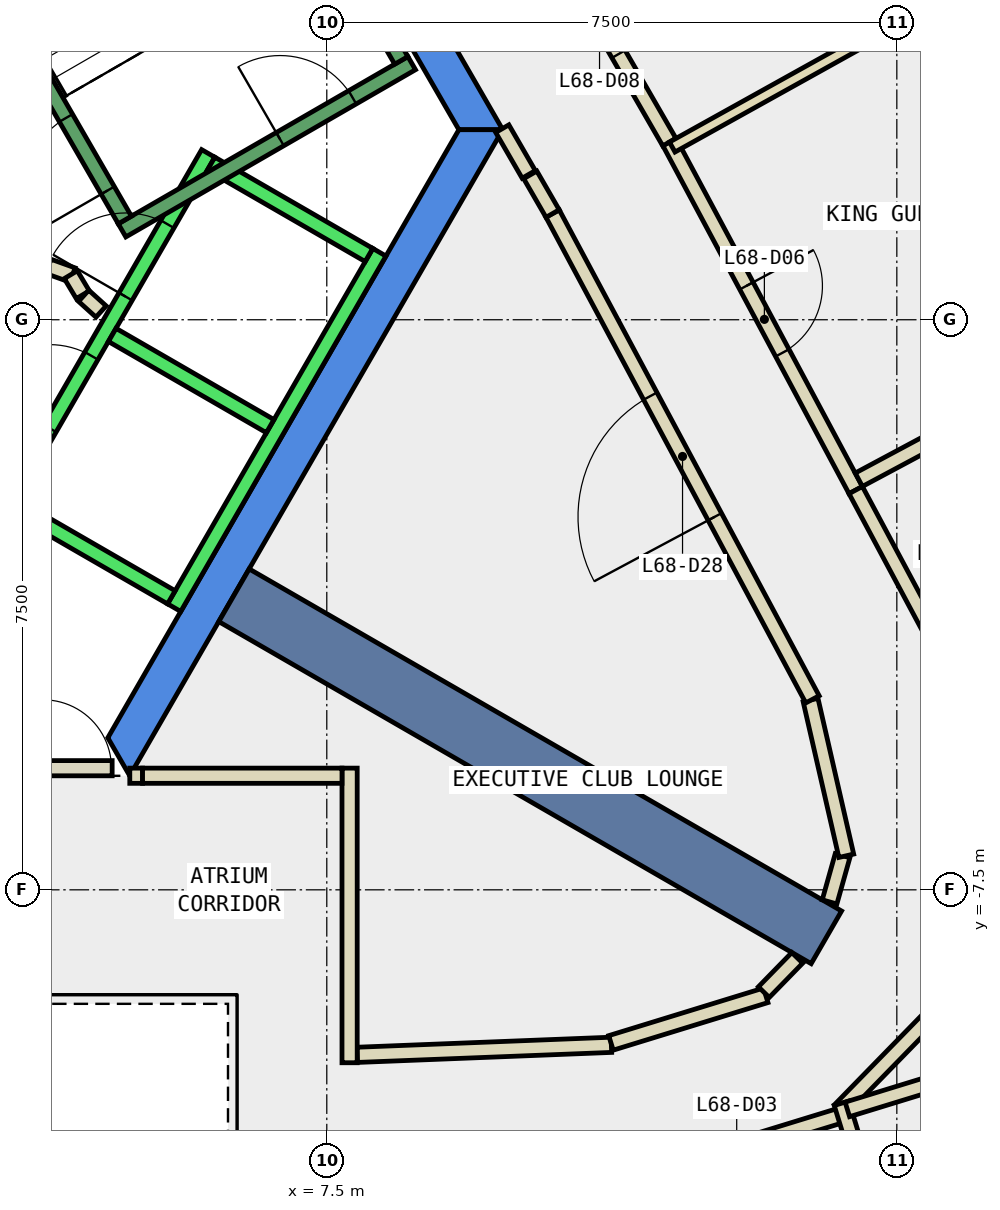
"""IFC4 building model, lengths in metres.
Left out: names, types, materials, properties, quantities, classifications, styles, units other than length and angle.
Written with IfcOpenShell. Run it as: python <this file> out.ifc"""

import sys

from ifc_helpers import new_model, si_unit, direction, frame, frame_2d, origin, place, context, subcontext, project, spatial, polyline, rectangle, outline, extrude, element, fill, save


model = new_model("IFC4")
c1 = context("Model", 3, precision=1e-05, world=origin(), true_north=direction((0.0, 1.0)))
c2 = subcontext(c1, "Body", "Model", "MODEL_VIEW")
j1 = project(units=[si_unit("LENGTHUNIT", "METRE"), si_unit("PLANEANGLEUNIT", "RADIAN")], contexts=[c1])
p1 = place(None, origin())
s1 = spatial("IfcSite", under=j1, at=p1, CompositionType="ELEMENT")
p2 = place(p1, origin())
s2 = spatial("IfcBuilding", under=s1, at=p2, CompositionType="ELEMENT")
p3 = place(p2, frame((0.0, 0.0, 293.6)))
s3 = spatial("IfcBuildingStorey", under=s2, at=p3, CompositionType="ELEMENT", Elevation=293.6)
p4 = place(p3, frame((0.0, 0.0, -0.34)))
e1 = element("IfcWall", 1, at=p4, inside=s3, PredefinedType="SHEAR", context=c2, shape_type="SweptSolid", body=[
    extrude(outline(polyline([(5.486, 9.998), (5.053, 9.748), (9.238, 2.5), (9.815, 2.5), (5.486, 9.998)])), origin(), (0.0, 0.0, 1.0), 3.6),
])
p5 = place(p3, frame((0.0, 0.0, -0.34)))
e2 = element("IfcWall", 2, at=p5, inside=s3, PredefinedType="SHEAR", context=c2, shape_type="SweptSolid", body=[
    extrude(outline(polyline([(4.907, -6.0), (9.815, 2.5), (9.238, 2.5), (4.619, -5.5), (4.907, -6.0)])), origin(), (0.0, 0.0, 1.0), 3.6),
])
p6 = place(p3, frame((6.279, -3.625, -0.34), z_axis=(0.0, 0.0, 1.0), x_axis=(0.866017533419, -0.500013631625, 0.0)))
e3 = element("IfcWall", 3, at=p6, inside=s3, PredefinedType="SHEAR", context=c2, shape_type="SweptSolid", body=[
    extrude(rectangle(XDim=9.0, YDim=0.8, at=frame_2d((4.5, 0.0))), origin(), (0.0, 0.0, 1.0), 3.6),
])
p7 = place(p3, frame((7.9, -9.671, 0.0), z_axis=(0.0, 0.0, 1.0), x_axis=(0.999223751627, 0.039394088186, 0.0)))
e4 = element("IfcWall", 4, at=p7, inside=s3, PredefinedType="PARTITIONING", context=c2, shape_type="SweptSolid", body=[
    extrude(rectangle(XDim=3.347, YDim=0.2, at=frame_2d((1.673, 0.0))), origin(), (0.0, 0.0, 1.0), 3.26),
])
p8 = place(p3, frame((11.239, -9.514, 0.0), z_axis=(0.0, 0.0, 1.0), x_axis=(0.955838469047, 0.293892533234, 0.0)))
e5 = element("IfcWall", 5, at=p8, inside=s3, PredefinedType="PARTITIONING", context=c2, shape_type="SweptSolid", body=[
    extrude(rectangle(XDim=2.13, YDim=0.2, at=frame_2d((1.065, 0.0))), origin(), (0.0, 0.0, 1.0), 3.26),
])
p9 = place(p3, frame((13.25, -8.846, 0.0), z_axis=(0.0, 0.0, 1.0), x_axis=(0.698333537371, 0.715772499181, 0.0)))
e6 = element("IfcWall", 6, at=p9, inside=s3, PredefinedType="PARTITIONING", context=c2, shape_type="SweptSolid", body=[
    extrude(rectangle(XDim=0.63, YDim=0.2, at=frame_2d((0.315, 0.0))), origin(), (0.0, 0.0, 1.0), 3.26),
])
p10 = place(p3, frame((14.115, -7.659, 0.0), z_axis=(0.0, 0.0, 1.0), x_axis=(0.270633612894, 0.96268242301, 0.0)))
e7 = element("IfcWall", 7, at=p10, inside=s3, PredefinedType="PARTITIONING", context=c2, shape_type="SweptSolid", body=[
    extrude(rectangle(XDim=0.632, YDim=0.2, at=frame_2d((0.316, 0.0))), origin(), (0.0, 0.0, 1.0), 3.26),
])
p11 = place(p3, frame((14.335, -7.052, 0.0), z_axis=(0.0, 0.0, 1.0), x_axis=(-0.22355315143, 0.974691740237, 0.0)))
e8 = element("IfcWall", 8, at=p11, inside=s3, PredefinedType="PARTITIONING", context=c2, shape_type="SweptSolid", body=[
    extrude(rectangle(XDim=2.102, YDim=0.2, at=frame_2d((1.051, 0.0))), origin(), (0.0, 0.0, 1.0), 3.26),
])
p12 = place(p3, frame((13.89, -4.994, 0.0), z_axis=(0.0, 0.0, 1.0), x_axis=(-0.471713767504, 0.881751734644, 0.0)))
e9 = element("IfcWall", 9, at=p12, inside=s3, PredefinedType="PARTITIONING", context=c2, shape_type="SweptSolid", body=[
    extrude(rectangle(XDim=7.248, YDim=0.2, at=frame_2d((3.624, 0.0))), origin(), (0.0, 0.0, 1.0), 3.26),
])
p13 = place(p12, frame((2.724, 0.0, 0.0)))
e10 = element("IfcOpeningElement", 10, at=p13, cuts=e9, PredefinedType="OPENING", context=c2, shape_type="SweptSolid", body=[
    extrude(rectangle(XDim=1.8, YDim=2.1, at=frame_2d((0.9, 1.05))), frame((0.0, 0.11, 0.0), z_axis=(0.0, -1.0, 0.0), x_axis=(1.0, 0.0, 0.0)), (0.0, 0.0, 1.0), 0.22),
])
p14 = place(p3, frame((10.471, 1.397, 0.0), z_axis=(0.0, 0.0, 1.0), x_axis=(-0.500069990121, 0.865984991198, 0.0)))
e11 = element("IfcWall", 11, at=p14, inside=s3, PredefinedType="PARTITIONING", context=c2, shape_type="SweptSolid", body=[
    extrude(rectangle(XDim=0.588, YDim=0.2, at=frame_2d((0.294, 0.0))), origin(), (0.0, 0.0, 1.0), 3.26),
])
p15 = place(p3, frame((10.157, 1.912, 0.0), z_axis=(0.0, 0.0, 1.0), x_axis=(-0.500482383858, 0.865746720148, 0.0)))
e12 = element("IfcWall", 12, at=p15, inside=s3, PredefinedType="PARTITIONING", context=c2, shape_type="SweptSolid", body=[
    extrude(rectangle(XDim=0.695, YDim=0.2, at=frame_2d((0.348, 0.0))), origin(), (0.0, 0.0, 1.0), 3.26),
])
p16 = place(p3, frame((14.243, -10.474, 0.0), z_axis=(0.0, 0.0, 1.0), x_axis=(-0.955937788993, -0.293569316475, 0.0)))
e13 = element("IfcWall", 13, at=p16, inside=s3, PredefinedType="PARTITIONING", context=c2, shape_type="SweptSolid", body=[
    extrude(rectangle(XDim=2.823, YDim=0.2, at=frame_2d((1.412, 0.0))), origin(), (0.0, 0.0, 1.0), 3.26),
])
p17 = place(p16, frame((0.912, 0.0, 0.0)))
e14 = element("IfcOpeningElement", 14, at=p17, cuts=e13, PredefinedType="OPENING", context=c2, shape_type="SweptSolid", body=[
    extrude(rectangle(XDim=1.0, YDim=2.1, at=frame_2d((0.5, 1.05))), frame((0.0, 0.11, 0.0), z_axis=(0.0, -1.0, 0.0), x_axis=(1.0, 0.0, 0.0)), (0.0, 0.0, 1.0), 0.22),
])
p18 = place(p3, frame((15.535, -9.081, 0.0), z_axis=(0.0, 0.0, 1.0), x_axis=(-0.698342132704, -0.715764113162, 0.0)))
e15 = element("IfcWall", 15, at=p18, inside=s3, PredefinedType="PARTITIONING", context=c2, shape_type="SweptSolid", body=[
    extrude(rectangle(XDim=1.836, YDim=0.2, at=frame_2d((0.918, 0.0))), origin(), (0.0, 0.0, 1.0), 3.26),
])
p19 = place(p3, frame((12.009, 2.338, 0.0), z_axis=(0.0, 0.0, 1.0), x_axis=(0.471771260231, -0.88172097515, 0.0)))
e16 = element("IfcWall", 16, at=p19, inside=s3, PredefinedType="PARTITIONING", context=c2, shape_type="SweptSolid", body=[
    extrude(rectangle(XDim=5.193, YDim=0.2, at=frame_2d((2.597, 0.0))), origin(), (0.0, 0.0, 1.0), 3.26),
])
p20 = place(p19, frame((2.146, 0.0, 0.0)))
e17 = element("IfcOpeningElement", 17, at=p20, cuts=e16, PredefinedType="OPENING", context=c2, shape_type="SweptSolid", body=[
    extrude(rectangle(XDim=1.0, YDim=2.1, at=frame_2d((0.5, 1.05))), frame((0.0, 0.11, 0.0), z_axis=(0.0, -1.0, 0.0), x_axis=(1.0, 0.0, 0.0)), (0.0, 0.0, 1.0), 0.22),
])
p21 = place(p3, frame((14.459, -2.241, 0.0), z_axis=(0.0, 0.0, 1.0), x_axis=(0.471648235011, -0.881786789656, 0.0)))
e18 = element("IfcWall", 18, at=p21, inside=s3, PredefinedType="PARTITIONING", context=c2, shape_type="SweptSolid", body=[
    extrude(rectangle(XDim=2.199, YDim=0.2, at=frame_2d((1.1, 0.0))), origin(), (0.0, 0.0, 1.0), 3.26),
])
p22 = place(p3, frame((10.17, 5.519, 0.0), z_axis=(0.0, 0.0, 1.0), x_axis=(0.499990860175, -0.866030680601, 0.0)))
e19 = element("IfcWall", 19, at=p22, inside=s3, PredefinedType="PARTITIONING", context=c2, shape_type="SweptSolid", body=[
    extrude(rectangle(XDim=3.674, YDim=0.2, at=frame_2d((1.837, 0.0))), origin(), (0.0, 0.0, 1.0), 3.26),
])
p23 = place(p22, frame((1.337, 0.0, 0.0)))
e20 = element("IfcOpeningElement", 20, at=p23, cuts=e19, PredefinedType="OPENING", context=c2, shape_type="SweptSolid", body=[
    extrude(rectangle(XDim=1.0, YDim=2.1, at=frame_2d((0.5, 1.05))), frame((0.0, 0.11, 0.0), z_axis=(0.0, -1.0, 0.0), x_axis=(1.0, 0.0, 0.0)), (0.0, 0.0, 1.0), 0.22),
])
p24 = place(p3, frame((3.838, 0.702, 0.0), z_axis=(0.0, 0.0, 1.0), x_axis=(0.941035081519, -0.338308993895, 0.0)))
e21 = element("IfcWall", 21, at=p24, inside=s3, PredefinedType="PARTITIONING", context=c2, shape_type="SweptSolid", body=[
    extrude(rectangle(XDim=0.337, YDim=0.2, at=frame_2d((0.168, 0.0))), origin(), (0.0, 0.0, 1.0), 3.26),
])
p25 = place(p3, frame((4.132, 0.593, 0.0), z_axis=(0.0, 0.0, 1.0), x_axis=(0.513561617048, -0.858052717201, 0.0)))
e22 = element("IfcWall", 22, at=p25, inside=s3, PredefinedType="PARTITIONING", context=c2, shape_type="SweptSolid", body=[
    extrude(rectangle(XDim=0.308, YDim=0.2, at=frame_2d((0.154, 0.0))), origin(), (0.0, 0.0, 1.0), 3.26),
])
p26 = place(p3, frame((4.301, 0.315, 0.0), z_axis=(0.0, 0.0, 1.0), x_axis=(0.741798017506, -0.670623367639, 0.0)))
e23 = element("IfcWall", 23, at=p26, inside=s3, PredefinedType="PARTITIONING", context=c2, shape_type="SweptSolid", body=[
    extrude(rectangle(XDim=0.309, YDim=0.2, at=frame_2d((0.154, 0.0))), origin(), (0.0, 0.0, 1.0), 3.26),
])
p27 = place(p3, frame((4.908, -5.999, 0.0), z_axis=(0.0, 0.0, 1.0), x_axis=(1.0, 0.0, 0.0)))
e24 = element("IfcWall", 24, at=p27, inside=s3, PredefinedType="PARTITIONING", context=c2, shape_type="SweptSolid", body=[
    extrude(rectangle(XDim=0.168, YDim=0.2, at=frame_2d((0.084, 0.0))), origin(), (0.0, 0.0, 1.0), 2.4),
])
p28 = place(p3, frame((7.8, -5.899, 0.0), z_axis=(0.0, 0.0, 1.0), x_axis=(0.0, -1.0, 0.0)))
e25 = element("IfcWall", 25, at=p28, inside=s3, PredefinedType="PARTITIONING", context=c2, shape_type="SweptSolid", body=[
    extrude(rectangle(XDim=3.876, YDim=0.2, at=frame_2d((1.938, 0.0))), origin(), (0.0, 0.0, 1.0), 3.26),
])
p29 = place(p3, frame((14.272, -10.308, 0.0), z_axis=(0.0, 0.0, 1.0), x_axis=(0.293868765171, -0.955845776711, 0.0)))
e26 = element("IfcWall", 26, at=p29, inside=s3, PredefinedType="PARTITIONING", context=c2, shape_type="SweptSolid", body=[
    extrude(rectangle(XDim=2.45, YDim=0.2, at=frame_2d((1.225, 0.0))), origin(), (0.0, 0.0, 1.0), 3.26),
])
p30 = place(p3, frame((16.022, -9.875, 0.0), z_axis=(0.0, 0.0, 1.0), x_axis=(-0.955908620472, -0.293664279932, 0.0)))
e27 = element("IfcWall", 27, at=p30, inside=s3, PredefinedType="PARTITIONING", context=c2, shape_type="SweptSolid", body=[
    extrude(rectangle(XDim=1.75, YDim=0.2, at=frame_2d((0.875, 0.0))), origin(), (0.0, 0.0, 1.0), 3.26),
])
p31 = place(p3, frame((16.44, -1.067, 0.0), z_axis=(0.0, 0.0, 1.0), x_axis=(-0.881700916894, -0.471808746367, 0.0)))
e28 = element("IfcWall", 28, at=p31, inside=s3, PredefinedType="PARTITIONING", context=c2, shape_type="SweptSolid", body=[
    extrude(rectangle(XDim=2.2, YDim=0.2, at=frame_2d((1.1, 0.0))), origin(), (0.0, 0.0, 1.0), 3.26),
])
p32 = place(p3, frame((12.045, 2.272, 0.0), z_axis=(0.0, 0.0, 1.0), x_axis=(0.873982340973, 0.485957680943, 0.0)))
e29 = element("IfcWall", 29, at=p32, inside=s3, PredefinedType="PARTITIONING", context=c2, shape_type="SweptSolid", body=[
    extrude(rectangle(XDim=4.28, YDim=0.15, at=frame_2d((2.14, 0.0))), origin(), (0.0, 0.0, 1.0), 3.26),
])
p33 = place(p3, frame((3.75, -5.9, 0.0), z_axis=(0.0, 0.0, 1.0), x_axis=(1.0, 0.0, 0.0)))
e30 = element("IfcWall", 30, at=p33, inside=s3, PredefinedType="PARTITIONING", context=c2, shape_type="SweptSolid", body=[
    extrude(rectangle(XDim=0.926, YDim=0.2, at=frame_2d((0.463, 0.0))), origin(), (0.0, 0.0, 1.0), 2.4),
])
p34 = place(p33, frame((0.017, 0.0, 0.0)))
e31 = element("IfcOpeningElement", 31, at=p34, cuts=e30, PredefinedType="OPENING", context=c2, shape_type="SweptSolid", body=[
    extrude(rectangle(XDim=0.9, YDim=2.1, at=frame_2d((0.45, 1.05))), frame((0.0, 0.11, 0.0), z_axis=(0.0, -1.0, 0.0), x_axis=(1.0, 0.0, 0.0)), (0.0, 0.0, 1.0), 0.22),
])
p35 = place(p3, frame((5.076, -5.999, 0.0), z_axis=(0.0, 0.0, 1.0), x_axis=(1.0, 0.0, 0.0)))
e32 = element("IfcWall", 32, at=p35, inside=s3, PredefinedType="PARTITIONING", context=c2, shape_type="SweptSolid", body=[
    extrude(rectangle(XDim=2.624, YDim=0.2, at=frame_2d((1.312, 0.0))), origin(), (0.0, 0.0, 1.0), 3.26),
])
p36 = place(p3, frame((3.24, -2.488, 0.0), z_axis=(0.0, 0.0, 1.0), x_axis=(0.500034260056, 0.866005622828, 0.0)))
e33 = element("IfcWall", 33, at=p36, inside=s3, PredefinedType="STANDARD", context=c2, shape_type="SweptSolid", body=[
    extrude(rectangle(XDim=5.399, YDim=0.2, at=frame_2d((2.7, 0.0))), origin(), (0.0, 0.0, 1.0), 3.26),
])
p37 = place(p36, frame((3.225, 0.0, 0.0)))
e34 = element("IfcOpeningElement", 34, at=p37, cuts=e33, PredefinedType="OPENING", context=c2, shape_type="SweptSolid", body=[
    extrude(rectangle(XDim=1.1, YDim=2.1, at=frame_2d((0.55, 1.05))), frame((0.0, 0.11, 0.0), z_axis=(0.0, -1.0, 0.0), x_axis=(1.0, 0.0, 0.0)), (0.0, 0.0, 1.0), 0.22),
])
p38 = place(p36, frame((1.225, 0.0, 0.0)))
e35 = element("IfcOpeningElement", 35, at=p38, cuts=e33, PredefinedType="OPENING", context=c2, shape_type="SweptSolid", body=[
    extrude(rectangle(XDim=1.1, YDim=2.1, at=frame_2d((0.55, 1.05))), frame((0.0, 0.11, 0.0), z_axis=(0.0, -1.0, 0.0), x_axis=(1.0, 0.0, 0.0)), (0.0, 0.0, 1.0), 0.22),
])
p39 = place(p3, frame((5.492, -3.788, 0.0), z_axis=(0.0, 0.0, 1.0), x_axis=(0.500034260056, 0.866005622828, 0.0)))
e36 = element("IfcWall", 36, at=p39, inside=s3, PredefinedType="STANDARD", context=c2, shape_type="SweptSolid", body=[
    extrude(rectangle(XDim=5.399, YDim=0.2, at=frame_2d((2.7, 0.0))), origin(), (0.0, 0.0, 1.0), 3.26),
])
p40 = place(p3, frame((3.377, -2.452, 0.0), z_axis=(0.0, 0.0, 1.0), x_axis=(0.865955154139, -0.50012165622, 0.0)))
e37 = element("IfcWall", 37, at=p40, inside=s3, PredefinedType="STANDARD", context=c2, shape_type="SweptSolid", body=[
    extrude(rectangle(XDim=2.4, YDim=0.2, at=frame_2d((1.2, 0.0))), origin(), (0.0, 0.0, 1.0), 3.26),
])
for number, where, z_axis, x_axis in (
    (38, (4.677, -0.2, 0.0), (0.0, 0.0, 1.0), (0.866, -0.5, 0.0)),
    (39, (5.977, 2.052, 0.0), (0.0, 0.0, 1.0), (0.866, -0.5, 0.0)),
):
    element("IfcWall", number, at=place(p3, frame(where, z_axis=z_axis, x_axis=x_axis)), inside=s3, PredefinedType="STANDARD", context=c2, shape_type="SweptSolid", body=[
        extrude(rectangle(XDim=2.399, YDim=0.2, at=frame_2d((1.2, 0.0))), origin(), (0.0, 0.0, 1.0), 3.26),
    ])
p41 = place(p3, frame((4.806, 1.176, 0.0), z_axis=(0.0, 0.0, 1.0), x_axis=(0.866059941101, 0.499940174841, 0.0)))
e40 = element("IfcWall", 40, at=p41, inside=s3, PredefinedType="STANDARD", context=c2, shape_type="SweptSolid", body=[
    extrude(rectangle(XDim=4.4, YDim=0.2, at=frame_2d((2.2, 0.0))), origin(), (0.0, 0.0, 1.0), 3.26),
])
p42 = place(p41, frame((2.4, 0.0, 0.0)))
e41 = element("IfcOpeningElement", 41, at=p42, cuts=e40, PredefinedType="OPENING", context=c2, shape_type="SweptSolid", body=[
    extrude(rectangle(XDim=1.1, YDim=2.2, at=frame_2d((0.55, 1.1))), frame((0.0, 0.11, 0.0), z_axis=(0.0, -1.0, 0.0), x_axis=(1.0, 0.0, 0.0)), (0.0, 0.0, 1.0), 0.22),
])
p43 = place(p3, frame((4.843, 1.312, 0.0), z_axis=(0.0, 0.0, 1.0), x_axis=(-0.499963383562, 0.866046543262, 0.0)))
e42 = element("IfcWall", 42, at=p43, inside=s3, PredefinedType="STANDARD", context=c2, shape_type="SweptSolid", body=[
    extrude(rectangle(XDim=6.9, YDim=0.2, at=frame_2d((3.45, 0.0))), origin(), (0.0, 0.0, 1.0), 3.26),
])
p44 = place(p43, frame((0.45, 0.0, 0.0)))
e43 = element("IfcOpeningElement", 43, at=p44, cuts=e42, PredefinedType="OPENING", context=c2, shape_type="SweptSolid", body=[
    extrude(rectangle(XDim=1.1, YDim=2.2, at=frame_2d((0.55, 1.1))), frame((0.0, 0.11, 0.0), z_axis=(0.0, -1.0, 0.0), x_axis=(1.0, 0.0, 0.0)), (0.0, 0.0, 1.0), 0.22),
])
p45 = place(p3, frame((8.48, 3.412, 0.0), z_axis=(0.0, 0.0, 1.0), x_axis=(-0.499978703459, 0.866037698999, 0.0)))
e44 = element("IfcWall", 44, at=p45, inside=s3, PredefinedType="STANDARD", context=c2, shape_type="SweptSolid", body=[
    extrude(rectangle(XDim=6.9, YDim=0.2, at=frame_2d((3.45, 0.0))), origin(), (0.0, 0.0, 1.0), 3.26),
])
p46 = place(p20, origin())
e45 = element("IfcDoor", 45, at=p46, inside=s3, OperationType="SINGLE_SWING_LEFT", PredefinedType="DOOR", context=c2, shape_type="SweptSolid", body=[
    extrude(rectangle(XDim=1.0, YDim=2.1, at=frame_2d((0.5, 1.05))), frame((0.0, 0.025, 0.0), z_axis=(0.0, -1.0, 0.0), x_axis=(1.0, 0.0, 0.0)), (0.0, 0.0, 1.0), 0.05),
])
fill(e17, e45)
p47 = place(p23, origin())
e46 = element("IfcDoor", 46, at=p47, inside=s3, OperationType="SINGLE_SWING_LEFT", PredefinedType="DOOR", context=c2, shape_type="SweptSolid", body=[
    extrude(rectangle(XDim=1.0, YDim=2.1, at=frame_2d((0.5, 1.05))), frame((0.0, 0.025, 0.0), z_axis=(0.0, -1.0, 0.0), x_axis=(1.0, 0.0, 0.0)), (0.0, 0.0, 1.0), 0.05),
])
fill(e20, e46)
p48 = place(p13, origin())
e47 = element("IfcDoor", 47, at=p48, inside=s3, OperationType="DOUBLE_DOOR_SINGLE_SWING", PredefinedType="DOOR", context=c2, shape_type="SweptSolid", body=[
    extrude(rectangle(XDim=1.8, YDim=2.1, at=frame_2d((0.9, 1.05))), frame((0.0, 0.025, 0.0), z_axis=(0.0, -1.0, 0.0), x_axis=(1.0, 0.0, 0.0)), (0.0, 0.0, 1.0), 0.05),
])
fill(e10, e47)
p49 = place(p34, origin())
e48 = element("IfcDoor", 48, at=p49, inside=s3, OperationType="SINGLE_SWING_LEFT", PredefinedType="DOOR", context=c2, shape_type="SweptSolid", body=[
    extrude(rectangle(XDim=0.9, YDim=2.1, at=frame_2d((0.45, 1.05))), frame((0.0, 0.025, 0.0), z_axis=(0.0, -1.0, 0.0), x_axis=(1.0, 0.0, 0.0)), (0.0, 0.0, 1.0), 0.05),
])
fill(e31, e48)
p50 = place(p37, origin())
e49 = element("IfcDoor", 49, at=p50, inside=s3, OperationType="SLIDING_TO_LEFT", PredefinedType="DOOR", context=c2, shape_type="SweptSolid", body=[
    extrude(rectangle(XDim=1.1, YDim=2.1, at=frame_2d((0.55, 1.05))), frame((0.0, 0.025, 0.0), z_axis=(0.0, -1.0, 0.0), x_axis=(1.0, 0.0, 0.0)), (0.0, 0.0, 1.0), 0.05),
])
fill(e34, e49)
p51 = place(p38, origin())
e50 = element("IfcDoor", 50, at=p51, inside=s3, OperationType="SLIDING_TO_LEFT", PredefinedType="DOOR", context=c2, shape_type="SweptSolid", body=[
    extrude(rectangle(XDim=1.1, YDim=2.1, at=frame_2d((0.55, 1.05))), frame((0.0, 0.025, 0.0), z_axis=(0.0, -1.0, 0.0), x_axis=(1.0, 0.0, 0.0)), (0.0, 0.0, 1.0), 0.05),
])
fill(e35, e50)
p52 = place(p44, origin())
e51 = element("IfcDoor", 51, at=p52, inside=s3, OperationType="SINGLE_SWING_LEFT", PredefinedType="DOOR", context=c2, shape_type="SweptSolid", body=[
    extrude(rectangle(XDim=1.1, YDim=2.2, at=frame_2d((0.55, 1.1))), frame((0.0, 0.025, 0.0), z_axis=(0.0, -1.0, 0.0), x_axis=(1.0, 0.0, 0.0)), (0.0, 0.0, 1.0), 0.05),
])
fill(e43, e51)
p53 = place(p42, origin())
e52 = element("IfcDoor", 52, at=p53, inside=s3, OperationType="SINGLE_SWING_LEFT", PredefinedType="DOOR", context=c2, shape_type="SweptSolid", body=[
    extrude(rectangle(XDim=1.1, YDim=2.2, at=frame_2d((0.55, 1.1))), frame((0.0, 0.025, 0.0), z_axis=(0.0, -1.0, 0.0), x_axis=(1.0, 0.0, 0.0)), (0.0, 0.0, 1.0), 0.05),
])
fill(e41, e52)
save(model, sys.argv[1])
